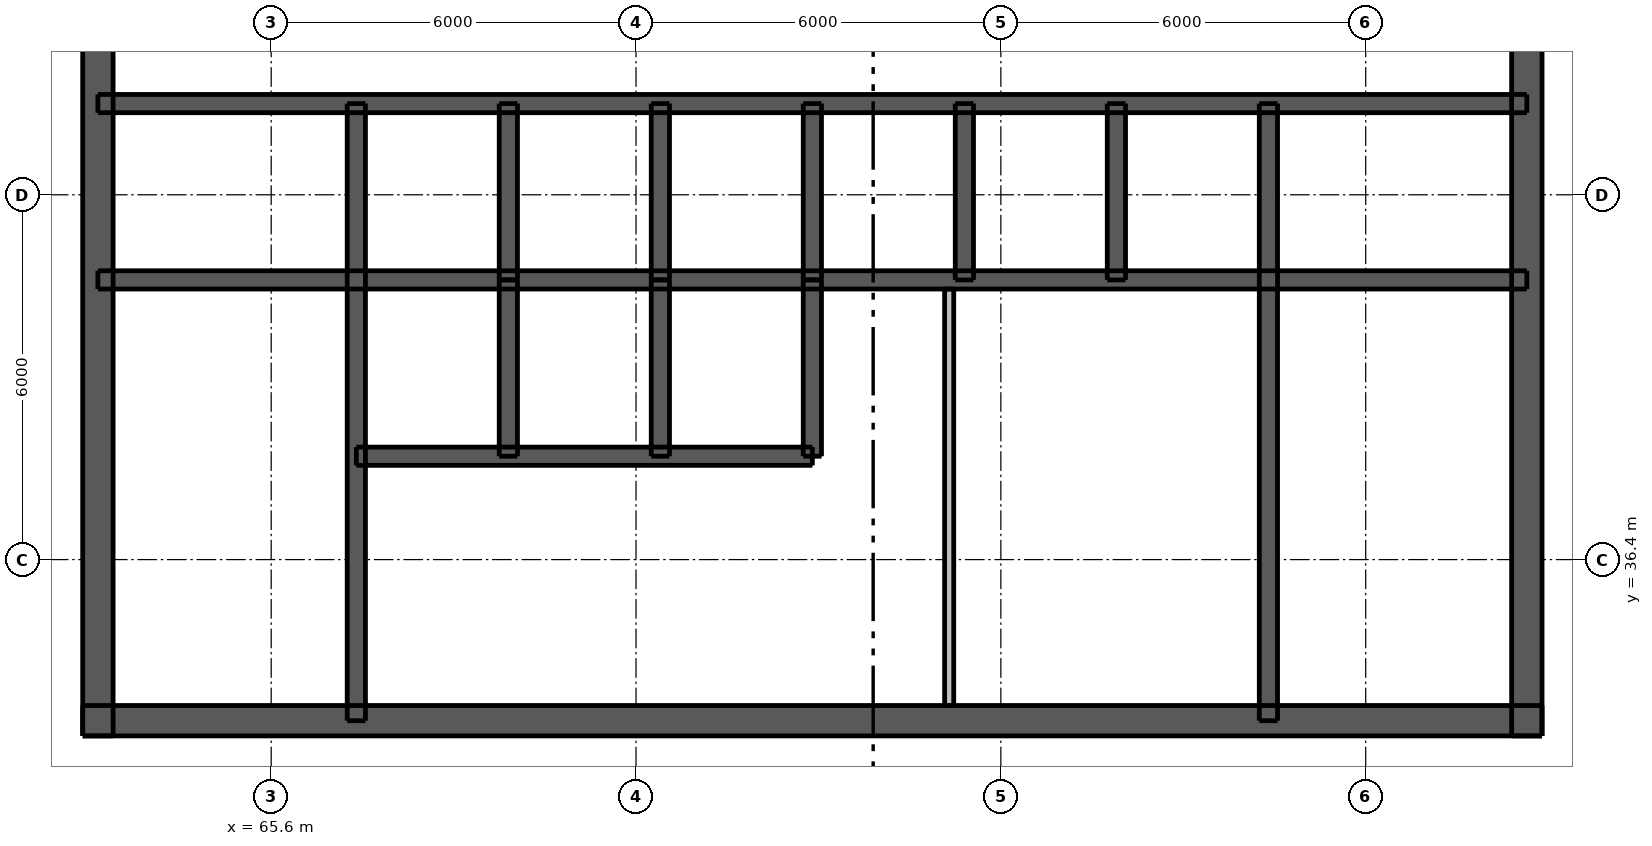
"""IFC4 building model, lengths in metres.
Left out: names, types, materials, properties, quantities, classifications, styles, units other than length and angle.
Written with IfcOpenShell. Run it as: python <this file> out.ifc"""

import sys

from ifc_helpers import new_model, si_unit, direction, frame, frame_2d, origin, place, context, subcontext, project, spatial, rectangle, extrude, element, fill, save


model = new_model("IFC4")
c1 = context("Model", 3, precision=1e-05, world=origin(), true_north=direction((0.0, 1.0)))
c2 = subcontext(c1, "Body", "Model", "MODEL_VIEW")
j1 = project(units=[si_unit("LENGTHUNIT", "METRE"), si_unit("PLANEANGLEUNIT", "RADIAN")], contexts=[c1])
p1 = place(None, origin())
s1 = spatial("IfcSite", under=j1, at=p1, CompositionType="ELEMENT")
p2 = place(p1, origin())
s2 = spatial("IfcBuilding", under=s1, at=p2, CompositionType="ELEMENT")
p3 = place(p2, frame((0.0, 0.0, 242.2)))
s3 = spatial("IfcBuildingStorey", under=s2, at=p3, CompositionType="ELEMENT", Elevation=242.2)
p4 = place(p3, frame((62.5, 33.75, 0.0), z_axis=(0.0, 0.0, 1.0), x_axis=(1.0, 0.0, 0.0)))
e1 = element("IfcWall", 1, at=p4, inside=s3, PredefinedType="SHEAR", context=c2, shape_type="SweptSolid", body=[
    extrude(rectangle(XDim=24.0, YDim=0.5, at=frame_2d((12.0, 0.0))), origin(), (0.0, 0.0, 1.0), 3.05),
])
p5 = place(p4, frame((1.875, 0.0, 0.0)))
e2 = element("IfcOpeningElement", 2, at=p5, cuts=e1, PredefinedType="OPENING", context=c2, shape_type="SweptSolid", body=[
    extrude(rectangle(XDim=1.1, YDim=2.1, at=frame_2d((0.55, 1.05))), frame((0.0, 0.26, 0.0), z_axis=(0.0, -1.0, 0.0), x_axis=(1.0, 0.0, 0.0)), (0.0, 0.0, 1.0), 0.52),
])
p6 = place(p4, frame((21.025, 0.0, 0.0)))
e3 = element("IfcOpeningElement", 3, at=p6, cuts=e1, PredefinedType="OPENING", context=c2, shape_type="SweptSolid", body=[
    extrude(rectangle(XDim=1.1, YDim=2.1, at=frame_2d((0.55, 1.05))), frame((0.0, 0.26, 0.0), z_axis=(0.0, -1.0, 0.0), x_axis=(1.0, 0.0, 0.0)), (0.0, 0.0, 1.0), 0.52),
])
p7 = place(p4, frame((8.0, 0.0, 0.0)))
e4 = element("IfcOpeningElement", 4, at=p7, cuts=e1, PredefinedType="OPENING", context=c2, shape_type="SweptSolid", body=[
    extrude(rectangle(XDim=1.1, YDim=2.1, at=frame_2d((0.55, 1.05))), frame((0.0, 0.26, 0.0), z_axis=(0.0, -1.0, 0.0), x_axis=(1.0, 0.0, 0.0)), (0.0, 0.0, 1.0), 0.52),
])
p8 = place(p4, frame((16.387, 0.0, 0.0)))
e5 = element("IfcOpeningElement", 5, at=p8, cuts=e1, PredefinedType="OPENING", context=c2, shape_type="SweptSolid", body=[
    extrude(rectangle(XDim=0.9, YDim=2.1, at=frame_2d((0.45, 1.05))), frame((0.0, 0.26, 0.0), z_axis=(0.0, -1.0, 0.0), x_axis=(1.0, 0.0, 0.0)), (0.0, 0.0, 1.0), 0.52),
])
p9 = place(p3, frame((62.75, 33.5, 0.0), z_axis=(0.0, 0.0, 1.0), x_axis=(0.0, 1.0, 0.0)))
e6 = element("IfcWall", 6, at=p9, inside=s3, PredefinedType="SHEAR", context=c2, shape_type="SweptSolid", body=[
    extrude(rectangle(XDim=24.0, YDim=0.5, at=frame_2d((12.0, 0.0))), origin(), (0.0, 0.0, 1.0), 3.05),
])
p10 = place(p9, frame((11.2, 0.0, 0.0)))
e7 = element("IfcOpeningElement", 7, at=p10, cuts=e6, PredefinedType="OPENING", context=c2, shape_type="SweptSolid", body=[
    extrude(rectangle(XDim=1.6, YDim=2.1, at=frame_2d((0.8, 1.05))), frame((0.0, 0.26, 0.0), z_axis=(0.0, -1.0, 0.0), x_axis=(1.0, 0.0, 0.0)), (0.0, 0.0, 1.0), 0.52),
])
p11 = place(p3, frame((86.25, 33.5, 0.0), z_axis=(0.0, 0.0, 1.0), x_axis=(0.0, 1.0, 0.0)))
e8 = element("IfcWall", 8, at=p11, inside=s3, PredefinedType="SHEAR", context=c2, shape_type="SweptSolid", body=[
    extrude(rectangle(XDim=24.0, YDim=0.5, at=frame_2d((12.0, 0.0))), origin(), (0.0, 0.0, 1.0), 3.05),
])
p12 = place(p11, frame((11.2, 0.0, 0.0)))
e9 = element("IfcOpeningElement", 9, at=p12, cuts=e8, PredefinedType="OPENING", context=c2, shape_type="SweptSolid", body=[
    extrude(rectangle(XDim=1.6, YDim=2.1, at=frame_2d((0.8, 1.05))), frame((0.0, 0.26, 0.0), z_axis=(0.0, -1.0, 0.0), x_axis=(1.0, 0.0, 0.0)), (0.0, 0.0, 1.0), 0.52),
])
p13 = place(p3, frame((62.75, 41.0, 0.0), z_axis=(0.0, 0.0, 1.0), x_axis=(1.0, 0.0, 0.0)))
e10 = element("IfcWall", 10, at=p13, inside=s3, PredefinedType="SHEAR", context=c2, shape_type="SweptSolid", body=[
    extrude(rectangle(XDim=23.5, YDim=0.3, at=frame_2d((11.75, 0.0))), origin(), (0.0, 0.0, 1.0), 3.05),
])
p14 = place(p3, frame((62.75, 43.9, 0.0), z_axis=(0.0, 0.0, 1.0), x_axis=(1.0, 0.0, 0.0)))
e11 = element("IfcWall", 11, at=p14, inside=s3, PredefinedType="SHEAR", context=c2, shape_type="SweptSolid", body=[
    extrude(rectangle(XDim=23.5, YDim=0.3, at=frame_2d((11.75, 0.0))), origin(), (0.0, 0.0, 1.0), 3.05),
])
p15 = place(p14, frame((1.725, 0.0, 0.0)))
e12 = element("IfcOpeningElement", 12, at=p15, cuts=e11, PredefinedType="OPENING", context=c2, shape_type="SweptSolid", body=[
    extrude(rectangle(XDim=0.9, YDim=2.1, at=frame_2d((0.45, 1.05))), frame((0.0, 0.16, 0.0), z_axis=(0.0, -1.0, 0.0), x_axis=(1.0, 0.0, 0.0)), (0.0, 0.0, 1.0), 0.32),
])
p16 = place(p14, frame((20.875, 0.0, 0.0)))
e13 = element("IfcOpeningElement", 13, at=p16, cuts=e11, PredefinedType="OPENING", context=c2, shape_type="SweptSolid", body=[
    extrude(rectangle(XDim=0.9, YDim=2.1, at=frame_2d((0.45, 1.05))), frame((0.0, 0.16, 0.0), z_axis=(0.0, -1.0, 0.0), x_axis=(1.0, 0.0, 0.0)), (0.0, 0.0, 1.0), 0.32),
])
p17 = place(p14, frame((7.55, 0.0, 0.0)))
e14 = element("IfcOpeningElement", 14, at=p17, cuts=e11, PredefinedType="OPENING", context=c2, shape_type="SweptSolid", body=[
    extrude(rectangle(XDim=0.9, YDim=2.1, at=frame_2d((0.45, 1.05))), frame((0.0, 0.16, 0.0), z_axis=(0.0, -1.0, 0.0), x_axis=(1.0, 0.0, 0.0)), (0.0, 0.0, 1.0), 0.32),
])
p18 = place(p14, frame((10.05, 0.0, 0.0)))
e15 = element("IfcOpeningElement", 15, at=p18, cuts=e11, PredefinedType="OPENING", context=c2, shape_type="SweptSolid", body=[
    extrude(rectangle(XDim=0.9, YDim=2.1, at=frame_2d((0.45, 1.05))), frame((0.0, 0.16, 0.0), z_axis=(0.0, -1.0, 0.0), x_axis=(1.0, 0.0, 0.0)), (0.0, 0.0, 1.0), 0.32),
])
p19 = place(p14, frame((15.05, 0.0, 0.0)))
e16 = element("IfcOpeningElement", 16, at=p19, cuts=e11, PredefinedType="OPENING", context=c2, shape_type="SweptSolid", body=[
    extrude(rectangle(XDim=0.9, YDim=2.1, at=frame_2d((0.45, 1.05))), frame((0.0, 0.16, 0.0), z_axis=(0.0, -1.0, 0.0), x_axis=(1.0, 0.0, 0.0)), (0.0, 0.0, 1.0), 0.32),
])
p20 = place(p14, frame((17.55, 0.0, 0.0)))
e17 = element("IfcOpeningElement", 17, at=p20, cuts=e11, PredefinedType="OPENING", context=c2, shape_type="SweptSolid", body=[
    extrude(rectangle(XDim=0.9, YDim=2.1, at=frame_2d((0.45, 1.05))), frame((0.0, 0.16, 0.0), z_axis=(0.0, -1.0, 0.0), x_axis=(1.0, 0.0, 0.0)), (0.0, 0.0, 1.0), 0.32),
])
p21 = place(p3, frame((67.0, 33.75, 0.0), z_axis=(0.0, 0.0, 1.0), x_axis=(0.0, 1.0, 0.0)))
e18 = element("IfcWall", 18, at=p21, inside=s3, PredefinedType="SHEAR", context=c2, shape_type="SweptSolid", body=[
    extrude(rectangle(XDim=10.15, YDim=0.3, at=frame_2d((5.075, 0.0))), origin(), (0.0, 0.0, 1.0), 3.05),
])
p22 = place(p21, frame((0.45, 0.0, 0.0)))
e19 = element("IfcOpeningElement", 19, at=p22, cuts=e18, PredefinedType="OPENING", context=c2, shape_type="SweptSolid", body=[
    extrude(rectangle(XDim=1.1, YDim=2.1, at=frame_2d((0.55, 1.05))), frame((0.0, 0.16, 0.0), z_axis=(0.0, -1.0, 0.0), x_axis=(1.0, 0.0, 0.0)), (0.0, 0.0, 1.0), 0.32),
])
p23 = place(p3, frame((82.0, 33.75, 0.0), z_axis=(0.0, 0.0, 1.0), x_axis=(0.0, 1.0, 0.0)))
e20 = element("IfcWall", 20, at=p23, inside=s3, PredefinedType="SHEAR", context=c2, shape_type="SweptSolid", body=[
    extrude(rectangle(XDim=10.15, YDim=0.3, at=frame_2d((5.075, 0.0))), origin(), (0.0, 0.0, 1.0), 3.05),
])
for number, where, z_axis, x_axis in (
    (21, (69.5, 41.0, 0.0), (0.0, 0.0, 1.0), (0.0, 1.0, 0.0)),
    (22, (72.0, 41.0, 0.0), (0.0, 0.0, 1.0), (0.0, 1.0, 0.0)),
    (23, (74.5, 41.0, 0.0), (0.0, 0.0, 1.0), (0.0, 1.0, 0.0)),
    (24, (77.0, 41.0, 0.0), (0.0, 0.0, 1.0), (0.0, 1.0, 0.0)),
    (25, (79.5, 41.0, 0.0), (0.0, 0.0, 1.0), (0.0, 1.0, 0.0)),
):
    element("IfcWall", number, at=place(p3, frame(where, z_axis=z_axis, x_axis=x_axis)), inside=s3, PredefinedType="SHEAR", context=c2, shape_type="SweptSolid", body=[
        extrude(rectangle(XDim=2.9, YDim=0.3, at=frame_2d((1.45, 0.0))), origin(), (0.0, 0.0, 1.0), 3.05),
    ])
p24 = place(p3, frame((67.0, 38.1, 0.0), z_axis=(0.0, 0.0, 1.0), x_axis=(1.0, 0.0, 0.0)))
e26 = element("IfcWall", 26, at=p24, inside=s3, PredefinedType="SHEAR", context=c2, shape_type="SweptSolid", body=[
    extrude(rectangle(XDim=7.5, YDim=0.3, at=frame_2d((3.75, 0.0))), origin(), (0.0, 0.0, 1.0), 3.05),
])
p25 = place(p24, frame((0.7, 0.0, 0.0)))
e27 = element("IfcOpeningElement", 27, at=p25, cuts=e26, PredefinedType="OPENING", context=c2, shape_type="SweptSolid", body=[
    extrude(rectangle(XDim=1.1, YDim=2.1, at=frame_2d((0.55, 1.05))), frame((0.0, 0.16, 0.0), z_axis=(0.0, -1.0, 0.0), x_axis=(1.0, 0.0, 0.0)), (0.0, 0.0, 1.0), 0.32),
])
p26 = place(p24, frame((3.2, 0.0, 0.0)))
e28 = element("IfcOpeningElement", 28, at=p26, cuts=e26, PredefinedType="OPENING", context=c2, shape_type="SweptSolid", body=[
    extrude(rectangle(XDim=1.1, YDim=2.1, at=frame_2d((0.55, 1.05))), frame((0.0, 0.16, 0.0), z_axis=(0.0, -1.0, 0.0), x_axis=(1.0, 0.0, 0.0)), (0.0, 0.0, 1.0), 0.32),
])
p27 = place(p24, frame((5.65, 0.0, 0.0)))
e29 = element("IfcOpeningElement", 29, at=p27, cuts=e26, PredefinedType="OPENING", context=c2, shape_type="SweptSolid", body=[
    extrude(rectangle(XDim=1.2, YDim=2.1, at=frame_2d((0.6, 1.05))), frame((0.0, 0.16, 0.0), z_axis=(0.0, -1.0, 0.0), x_axis=(1.0, 0.0, 0.0)), (0.0, 0.0, 1.0), 0.32),
])
for number, where, z_axis, x_axis in (
    (30, (69.5, 38.1, 0.0), (0.0, 0.0, 1.0), (0.0, 1.0, 0.0)),
    (31, (72.0, 38.1, 0.0), (0.0, 0.0, 1.0), (0.0, 1.0, 0.0)),
    (32, (74.5, 38.1, 0.0), (0.0, 0.0, 1.0), (0.0, 1.0, 0.0)),
):
    element("IfcWall", number, at=place(p3, frame(where, z_axis=z_axis, x_axis=x_axis)), inside=s3, PredefinedType="SHEAR", context=c2, shape_type="SweptSolid", body=[
        extrude(rectangle(XDim=2.9, YDim=0.3, at=frame_2d((1.45, 0.0))), origin(), (0.0, 0.0, 1.0), 3.05),
    ])
p28 = place(p3, frame((76.75, 34.0, 0.0), z_axis=(0.0, 0.0, 1.0), x_axis=(0.0, 1.0, 0.0)))
e33 = element("IfcWall", 33, at=p28, inside=s3, PredefinedType="PLUMBINGWALL", context=c2, shape_type="SweptSolid", body=[
    extrude(rectangle(XDim=6.85, YDim=0.15, at=frame_2d((3.425, 0.0))), origin(), (0.0, 0.0, 1.0), 3.05),
])
p29 = place(p5, origin())
e34 = element("IfcDoor", 34, at=p29, inside=s3, OperationType="SINGLE_SWING_LEFT", PredefinedType="DOOR", context=c2, shape_type="SweptSolid", body=[
    extrude(rectangle(XDim=1.1, YDim=2.1, at=frame_2d((0.55, 1.05))), frame((0.0, 0.237, 0.0), z_axis=(0.0, -1.0, 0.0), x_axis=(1.0, 0.0, 0.0)), (0.0, 0.0, 1.0), 0.05),
])
fill(e2, e34)
p30 = place(p6, origin())
e35 = element("IfcDoor", 35, at=p30, inside=s3, OperationType="SINGLE_SWING_RIGHT", PredefinedType="DOOR", context=c2, shape_type="SweptSolid", body=[
    extrude(rectangle(XDim=1.1, YDim=2.1, at=frame_2d((0.55, 1.05))), frame((0.0, 0.237, 0.0), z_axis=(0.0, -1.0, 0.0), x_axis=(1.0, 0.0, 0.0)), (0.0, 0.0, 1.0), 0.05),
])
fill(e3, e35)
p31 = place(p10, origin())
e36 = element("IfcDoor", 36, at=p31, inside=s3, OperationType="DOUBLE_DOOR_SINGLE_SWING", PredefinedType="DOOR", context=c2, shape_type="SweptSolid", body=[
    extrude(rectangle(XDim=1.6, YDim=2.1, at=frame_2d((0.8, 1.05))), frame((0.0, -0.188, 0.0), z_axis=(0.0, -1.0, 0.0), x_axis=(1.0, 0.0, 0.0)), (0.0, 0.0, 1.0), 0.05),
])
fill(e7, e36)
p32 = place(p12, origin())
e37 = element("IfcDoor", 37, at=p32, inside=s3, OperationType="DOUBLE_DOOR_SINGLE_SWING", PredefinedType="DOOR", context=c2, shape_type="SweptSolid", body=[
    extrude(rectangle(XDim=1.6, YDim=2.1, at=frame_2d((0.8, 1.05))), frame((0.0, 0.237, 0.0), z_axis=(0.0, -1.0, 0.0), x_axis=(1.0, 0.0, 0.0)), (0.0, 0.0, 1.0), 0.05),
])
fill(e9, e37)
p33 = place(p7, origin())
e38 = element("IfcDoor", 38, at=p33, inside=s3, OperationType="SINGLE_SWING_LEFT", PredefinedType="DOOR", context=c2, shape_type="SweptSolid", body=[
    extrude(rectangle(XDim=1.1, YDim=2.1, at=frame_2d((0.55, 1.05))), frame((0.0, 0.237, 0.0), z_axis=(0.0, -1.0, 0.0), x_axis=(1.0, 0.0, 0.0)), (0.0, 0.0, 1.0), 0.05),
])
fill(e4, e38)
p34 = place(p22, origin())
e39 = element("IfcDoor", 39, at=p34, inside=s3, OperationType="SINGLE_SWING_RIGHT", PredefinedType="DOOR", context=c2, shape_type="SweptSolid", body=[
    extrude(rectangle(XDim=1.1, YDim=2.1, at=frame_2d((0.55, 1.05))), frame((0.0, -0.087, 0.0), z_axis=(0.0, -1.0, 0.0), x_axis=(1.0, 0.0, 0.0)), (0.0, 0.0, 1.0), 0.05),
])
fill(e19, e39)
p35 = place(p8, origin())
e40 = element("IfcDoor", 40, at=p35, inside=s3, OperationType="SINGLE_SWING_LEFT", PredefinedType="DOOR", context=c2, shape_type="SweptSolid", body=[
    extrude(rectangle(XDim=0.9, YDim=2.1, at=frame_2d((0.45, 1.05))), frame((0.0, 0.237, 0.0), z_axis=(0.0, -1.0, 0.0), x_axis=(1.0, 0.0, 0.0)), (0.0, 0.0, 1.0), 0.05),
])
fill(e5, e40)
p36 = place(p15, origin())
e41 = element("IfcDoor", 41, at=p36, inside=s3, OperationType="SINGLE_SWING_LEFT", PredefinedType="DOOR", context=c2, shape_type="SweptSolid", body=[
    extrude(rectangle(XDim=0.9, YDim=2.1, at=frame_2d((0.45, 1.05))), frame((0.0, -0.087, 0.0), z_axis=(0.0, -1.0, 0.0), x_axis=(1.0, 0.0, 0.0)), (0.0, 0.0, 1.0), 0.05),
])
fill(e12, e41)
p37 = place(p16, origin())
e42 = element("IfcDoor", 42, at=p37, inside=s3, OperationType="SINGLE_SWING_LEFT", PredefinedType="DOOR", context=c2, shape_type="SweptSolid", body=[
    extrude(rectangle(XDim=0.9, YDim=2.1, at=frame_2d((0.45, 1.05))), frame((0.0, -0.087, 0.0), z_axis=(0.0, -1.0, 0.0), x_axis=(1.0, 0.0, 0.0)), (0.0, 0.0, 1.0), 0.05),
])
fill(e13, e42)
p38 = place(p17, origin())
e43 = element("IfcDoor", 43, at=p38, inside=s3, OperationType="SINGLE_SWING_LEFT", PredefinedType="DOOR", context=c2, shape_type="SweptSolid", body=[
    extrude(rectangle(XDim=0.9, YDim=2.1, at=frame_2d((0.45, 1.05))), frame((0.0, -0.087, 0.0), z_axis=(0.0, -1.0, 0.0), x_axis=(1.0, 0.0, 0.0)), (0.0, 0.0, 1.0), 0.05),
])
fill(e14, e43)
p39 = place(p18, origin())
e44 = element("IfcDoor", 44, at=p39, inside=s3, OperationType="SINGLE_SWING_RIGHT", PredefinedType="DOOR", context=c2, shape_type="SweptSolid", body=[
    extrude(rectangle(XDim=0.9, YDim=2.1, at=frame_2d((0.45, 1.05))), frame((0.0, -0.087, 0.0), z_axis=(0.0, -1.0, 0.0), x_axis=(1.0, 0.0, 0.0)), (0.0, 0.0, 1.0), 0.05),
])
fill(e15, e44)
p40 = place(p19, origin())
e45 = element("IfcDoor", 45, at=p40, inside=s3, OperationType="SINGLE_SWING_RIGHT", PredefinedType="DOOR", context=c2, shape_type="SweptSolid", body=[
    extrude(rectangle(XDim=0.9, YDim=2.1, at=frame_2d((0.45, 1.05))), frame((0.0, -0.087, 0.0), z_axis=(0.0, -1.0, 0.0), x_axis=(1.0, 0.0, 0.0)), (0.0, 0.0, 1.0), 0.05),
])
fill(e16, e45)
p41 = place(p20, origin())
e46 = element("IfcDoor", 46, at=p41, inside=s3, OperationType="SINGLE_SWING_LEFT", PredefinedType="DOOR", context=c2, shape_type="SweptSolid", body=[
    extrude(rectangle(XDim=0.9, YDim=2.1, at=frame_2d((0.45, 1.05))), frame((0.0, -0.087, 0.0), z_axis=(0.0, -1.0, 0.0), x_axis=(1.0, 0.0, 0.0)), (0.0, 0.0, 1.0), 0.05),
])
fill(e17, e46)
p42 = place(p25, origin())
e47 = element("IfcDoor", 47, at=p42, inside=s3, OperationType="DOUBLE_DOOR_SLIDING", PredefinedType="DOOR", context=c2, shape_type="SweptSolid", body=[
    extrude(rectangle(XDim=1.1, YDim=2.1, at=frame_2d((0.55, 1.05))), frame((0.0, 0.025, 0.0), z_axis=(0.0, -1.0, 0.0), x_axis=(1.0, 0.0, 0.0)), (0.0, 0.0, 1.0), 0.05),
])
fill(e27, e47)
p43 = place(p26, origin())
e48 = element("IfcDoor", 48, at=p43, inside=s3, OperationType="DOUBLE_DOOR_SLIDING", PredefinedType="DOOR", context=c2, shape_type="SweptSolid", body=[
    extrude(rectangle(XDim=1.1, YDim=2.1, at=frame_2d((0.55, 1.05))), frame((0.0, 0.025, 0.0), z_axis=(0.0, -1.0, 0.0), x_axis=(1.0, 0.0, 0.0)), (0.0, 0.0, 1.0), 0.05),
])
fill(e28, e48)
p44 = place(p27, origin())
e49 = element("IfcDoor", 49, at=p44, inside=s3, OperationType="DOUBLE_DOOR_SLIDING", PredefinedType="DOOR", context=c2, shape_type="SweptSolid", body=[
    extrude(rectangle(XDim=1.2, YDim=2.1, at=frame_2d((0.6, 1.05))), frame((0.0, 0.025, 0.0), z_axis=(0.0, -1.0, 0.0), x_axis=(1.0, 0.0, 0.0)), (0.0, 0.0, 1.0), 0.05),
])
fill(e29, e49)
save(model, sys.argv[1])
